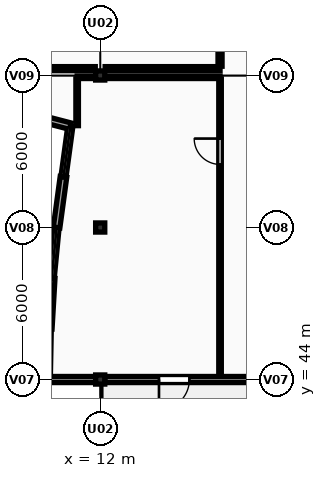
"""IFC4 building model, lengths in metres.
Left out: names, types, materials, properties, quantities, classifications, styles, units other than length and angle.
Written with IfcOpenShell. Run it as: python <this file> out.ifc"""

import sys

from ifc_helpers import new_model, si_unit, direction, frame, frame_2d, origin, origin_2d, place, context, subcontext, project, spatial, rectangle, extrude, element, fill, save


model = new_model("IFC4")
c1 = context("Model", 3, precision=1e-05, world=origin(), true_north=direction((0.0, 1.0)))
c2 = subcontext(c1, "Body", "Model", "MODEL_VIEW")
j1 = project(units=[si_unit("LENGTHUNIT", "METRE"), si_unit("PLANEANGLEUNIT", "RADIAN")], contexts=[c1])
p1 = place(None, origin())
s1 = spatial("IfcSite", under=j1, at=p1, CompositionType="ELEMENT")
p2 = place(p1, origin())
s2 = spatial("IfcBuilding", under=s1, at=p2, CompositionType="ELEMENT")
p3 = place(p2, frame((0.0, 0.0, 8.4)))
s3 = spatial("IfcBuildingStorey", under=s2, at=p3, CompositionType="ELEMENT", Elevation=8.4)
for number, where, z_axis, x_axis in (
    (1, (12.0, 44.0, 0.0), (0.0, 0.0, 1.0), (1.0, 0.0, 0.0)),
    (2, (12.0, 50.0, 0.0), (0.0, 0.0, 1.0), (1.0, 0.0, 0.0)),
    (3, (12.0, 56.0, 0.0), (0.0, 0.0, 1.0), (1.0, 0.0, 0.0)),
):
    element("IfcColumn", number, at=place(p3, frame(where, z_axis=z_axis, x_axis=x_axis)), inside=s3, PredefinedType="COLUMN", context=c2, shape_type="SweptSolid", body=[
        extrude(rectangle(XDim=0.36, YDim=0.36, at=origin_2d()), origin(), (0.0, 0.0, 1.0), 3.9),
    ])
p4 = place(p3, frame((9.969, 46.0, 0.0), z_axis=(0.0, 0.0, 1.0), x_axis=(0.057643251596, 0.998337245396, 0.0)))
e4 = element("IfcWall", 4, at=p4, inside=s3, PredefinedType="SOLIDWALL", context=c2, shape_type="SweptSolid", body=[
    extrude(rectangle(XDim=2.003, YDim=0.26, at=frame_2d((1.002, 0.0))), origin(), (0.0, 0.0, 1.0), 3.65),
])
p5 = place(p3, frame((10.085, 48.0, 0.0), z_axis=(0.0, 0.0, 1.0), x_axis=(0.09623099978, 0.99535902803, 0.0)))
e5 = element("IfcWall", 5, at=p5, inside=s3, PredefinedType="SOLIDWALL", context=c2, shape_type="SweptSolid", body=[
    extrude(rectangle(XDim=2.009, YDim=0.2, at=frame_2d((1.005, 0.0))), origin(), (0.0, 0.0, 1.0), 0.95),
])
p6 = place(p3, frame((10.278, 50.0, 0.0), z_axis=(0.0, 0.0, 1.0), x_axis=(0.134627389588, 0.990896294257, 0.0)))
e6 = element("IfcWall", 6, at=p6, inside=s3, PredefinedType="SOLIDWALL", context=c2, shape_type="SweptSolid", body=[
    extrude(rectangle(XDim=2.018, YDim=0.26, at=frame_2d((1.009, 0.0))), origin(), (0.0, 0.0, 1.0), 3.65),
])
p7 = place(p3, frame((10.55, 52.0, 0.0), z_axis=(0.0, 0.0, 1.0), x_axis=(0.134627389588, 0.990896294257, 0.0)))
e7 = element("IfcWall", 7, at=p7, inside=s3, PredefinedType="SOLIDWALL", context=c2, shape_type="SweptSolid", body=[
    extrude(rectangle(XDim=2.018, YDim=0.2, at=frame_2d((1.009, 0.0))), origin(), (0.0, 0.0, 1.0), 0.95),
])
p8 = place(p3, frame((10.822, 54.0, 0.0), z_axis=(0.0, 0.0, 1.0), x_axis=(-0.967937555254, 0.251190941573, 0.0)))
e8 = element("IfcWall", 8, at=p8, inside=s3, PredefinedType="SOLIDWALL", context=c2, shape_type="SweptSolid", body=[
    extrude(rectangle(XDim=7.962, YDim=0.26, at=frame_2d((3.981, 0.0))), origin(), (0.0, 0.0, 1.0), 3.65),
])
p9 = place(p8, frame((2.981, 0.0, 0.95)))
e9 = element("IfcOpeningElement", 9, at=p9, cuts=e8, PredefinedType="OPENING", context=c2, shape_type="SweptSolid", body=[
    extrude(rectangle(XDim=2.0, YDim=1.5, at=frame_2d((1.0, 0.75))), frame((0.0, 0.14, 0.0), z_axis=(0.0, -1.0, 0.0), x_axis=(1.0, 0.0, 0.0)), (0.0, 0.0, 1.0), 0.28),
])
p10 = place(p3, frame((19.82, 44.0, 0.0), z_axis=(0.0, 0.0, 1.0), x_axis=(-1.0, 0.0, 0.0)))
e10 = element("IfcWall", 10, at=p10, inside=s3, PredefinedType="SOLIDWALL", context=c2, shape_type="SweptSolid", body=[
    extrude(rectangle(XDim=7.64, YDim=0.24, at=frame_2d((3.82, 0.0))), origin(), (0.0, 0.0, 1.0), 3.088),
])
p11 = place(p10, frame((4.3, 0.0, 0.0)))
e11 = element("IfcOpeningElement", 11, at=p11, cuts=e10, PredefinedType="OPENING", context=c2, shape_type="SweptSolid", body=[
    extrude(rectangle(XDim=1.2, YDim=2.15, at=frame_2d((0.6, 1.075))), frame((0.0, 0.13, 0.0), z_axis=(0.0, -1.0, 0.0), x_axis=(1.0, 0.0, 0.0)), (0.0, 0.0, 1.0), 0.26),
])
p12 = place(p3, frame((11.82, 44.0, 0.0), z_axis=(0.0, 0.0, 1.0), x_axis=(-1.0, 0.0, 0.0)))
e12 = element("IfcWall", 12, at=p12, inside=s3, PredefinedType="SOLIDWALL", context=c2, shape_type="SweptSolid", body=[
    extrude(rectangle(XDim=1.889, YDim=0.24, at=frame_2d((0.945, 0.0))), origin(), (0.0, 0.0, 1.0), 3.09),
])
p13 = place(p3, frame((3.289, 56.27, 0.0), z_axis=(0.0, 0.0, 1.0), x_axis=(1.0, 0.0, 0.0)))
e13 = element("IfcWall", 13, at=p13, inside=s3, PredefinedType="PARTITIONING", context=c2, shape_type="SweptSolid", body=[
    extrude(rectangle(XDim=8.516, YDim=0.16, at=frame_2d((4.258, 0.0))), origin(), (0.0, 0.0, 1.0), 3.09),
])
p14 = place(p3, frame((12.195, 56.27, 0.0), z_axis=(0.0, 0.0, 1.0), x_axis=(1.0, 0.0, 0.0)))
e14 = element("IfcWall", 14, at=p14, inside=s3, PredefinedType="PARTITIONING", context=c2, shape_type="SweptSolid", body=[
    extrude(rectangle(XDim=4.535, YDim=0.16, at=frame_2d((2.268, 0.0))), origin(), (0.0, 0.0, 1.0), 3.088),
])
p15 = place(p3, frame((16.73, 56.365, 0.0), z_axis=(0.0, 0.0, 1.0), x_axis=(0.0, 1.0, 0.0)))
e15 = element("IfcWall", 15, at=p15, inside=s3, PredefinedType="PARTITIONING", context=c2, shape_type="SweptSolid", body=[
    extrude(rectangle(XDim=7.635, YDim=0.16, at=frame_2d((3.817, 0.0))), origin(), (0.0, 0.0, 1.0), 3.65),
])
p16 = place(p15, frame((6.235, 0.0, 0.0)))
e16 = element("IfcOpeningElement", 16, at=p16, cuts=e15, PredefinedType="OPENING", context=c2, shape_type="SweptSolid", body=[
    extrude(rectangle(XDim=1.0, YDim=2.15, at=frame_2d((0.5, 1.075))), frame((0.0, 0.09, 0.0), z_axis=(0.0, -1.0, 0.0), x_axis=(1.0, 0.0, 0.0)), (0.0, 0.0, 1.0), 0.18),
])
p17 = place(p3, frame((11.09, 55.93, 0.0), z_axis=(0.0, 0.0, 1.0), x_axis=(1.0, 0.0, 0.0)))
e17 = element("IfcWall", 17, at=p17, inside=s3, PredefinedType="PARTITIONING", context=c2, shape_type="SweptSolid", body=[
    extrude(rectangle(XDim=5.64, YDim=0.1, at=frame_2d((2.82, 0.0))), origin(), (0.0, 0.0, 1.0), 3.088),
])
p18 = place(p3, frame((11.09, 54.02, 0.0), z_axis=(0.0, 0.0, 1.0), x_axis=(0.0, 1.0, 0.0)))
e18 = element("IfcWall", 18, at=p18, inside=s3, PredefinedType="PARTITIONING", context=c2, shape_type="SweptSolid", body=[
    extrude(rectangle(XDim=1.845, YDim=0.1, at=frame_2d((0.922, 0.0))), origin(), (0.0, 0.0, 1.0), 3.65),
])
p19 = place(p3, frame((16.73, 44.162, 0.0), z_axis=(0.0, 0.0, 1.0), x_axis=(0.0, 1.0, 0.0)))
e19 = element("IfcWall", 19, at=p19, inside=s3, PredefinedType="PARTITIONING", context=c2, shape_type="SweptSolid", body=[
    extrude(rectangle(XDim=11.703, YDim=0.1, at=frame_2d((5.852, 0.0))), origin(), (0.0, 0.0, 1.0), 3.65),
])
p20 = place(p19, frame((8.328, 0.0, 0.0)))
e20 = element("IfcOpeningElement", 20, at=p20, cuts=e19, PredefinedType="OPENING", context=c2, shape_type="SweptSolid", body=[
    extrude(rectangle(XDim=1.02, YDim=2.1, at=frame_2d((0.51, 1.05))), frame((0.0, 0.06, 0.0), z_axis=(0.0, -1.0, 0.0), x_axis=(1.0, 0.0, 0.0)), (0.0, 0.0, 1.0), 0.12),
])
p21 = place(p11, origin())
e21 = element("IfcDoor", 21, at=p21, inside=s3, OperationType="SINGLE_SWING_RIGHT", PredefinedType="DOOR", context=c2, shape_type="SweptSolid", body=[
    extrude(rectangle(XDim=1.2, YDim=2.15, at=frame_2d((0.6, 1.075))), frame((0.0, 0.025, 0.0), z_axis=(0.0, -1.0, 0.0), x_axis=(1.0, 0.0, 0.0)), (0.0, 0.0, 1.0), 0.05),
])
fill(e11, e21)
p22 = place(p20, origin())
e22 = element("IfcDoor", 22, at=p22, inside=s3, OperationType="SINGLE_SWING_RIGHT", PredefinedType="DOOR", context=c2, shape_type="SweptSolid", body=[
    extrude(rectangle(XDim=1.02, YDim=2.1, at=frame_2d((0.51, 1.05))), frame((0.0, 0.025, 0.0), z_axis=(0.0, -1.0, 0.0), x_axis=(1.0, 0.0, 0.0)), (0.0, 0.0, 1.0), 0.05),
])
fill(e20, e22)
save(model, sys.argv[1])
